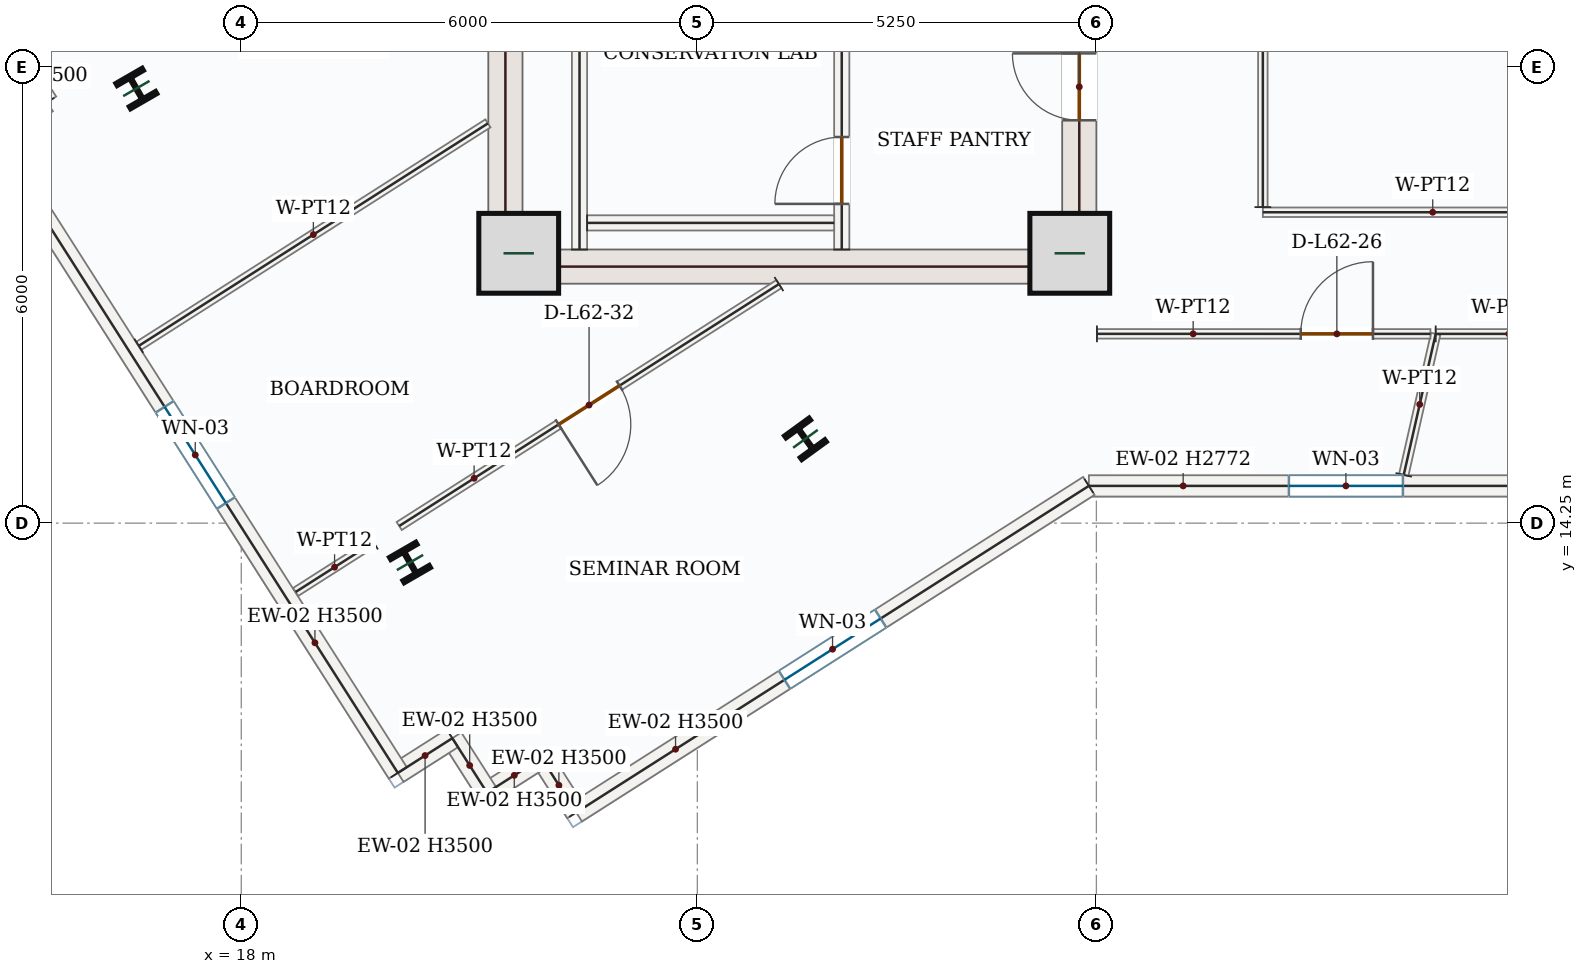
"""IFC4 building model, lengths in metres.
Left out: names, types, materials, properties, quantities, classifications, styles, units other than length and angle.
Written with IfcOpenShell. Run it as: python <this file> out.ifc"""

import sys

from ifc_helpers import new_model, si_unit, direction, frame, frame_2d, origin, origin_2d, place, context, subcontext, project, spatial, rectangle, i_section, extrude, source, transform, mapped, element, fill, save


model = new_model("IFC4")
c1 = context("Model", 3, precision=1e-05, world=origin(), true_north=direction((0.0, 1.0)))
c2 = subcontext(c1, "Body", "Model", "MODEL_VIEW")
j1 = project(units=[si_unit("LENGTHUNIT", "METRE"), si_unit("PLANEANGLEUNIT", "RADIAN")], contexts=[c1])
p1 = place(None, origin())
s1 = spatial("IfcSite", under=j1, at=p1, CompositionType="ELEMENT")
p2 = place(p1, origin())
s2 = spatial("IfcBuilding", under=s1, at=p2, CompositionType="ELEMENT")
p3 = place(p2, frame((0.0, 0.0, 261.6)))
s3 = spatial("IfcBuildingStorey", under=s2, at=p3, CompositionType="ELEMENT", Elevation=261.6)
m1 = source(origin(), c2, "Body", "SweptSolid", [
    extrude(rectangle(XDim=8.55, YDim=0.45, at=frame_2d((4.275, 0.0))), origin(), (0.0, 0.0, 1.0), 3.5),
])
p4 = place(p3, frame((21.475, 17.4, 0.0), z_axis=(0.0, 0.0, 1.0), x_axis=(0.0, 1.0, 0.0)))
e1 = element("IfcWall", 1, at=p4, inside=s3, PredefinedType="SHEAR", context=c2, shape_type="MappedRepresentation", body=[
    mapped(m1, transform((0.0, 0.0, 0.0), x_axis=(1.0, 0.0, 0.0), y_axis=(0.0, 1.0, 0.0), z_axis=(0.0, 0.0, 1.0), scale=1.0)),
])
p5 = place(p3, frame((29.025, 17.4, 0.0), z_axis=(0.0, 0.0, 1.0), x_axis=(0.0, 1.0, 0.0)))
e2 = element("IfcWall", 2, at=p5, inside=s3, PredefinedType="SHEAR", context=c2, shape_type="SweptSolid", body=[
    extrude(rectangle(XDim=8.55, YDim=0.45, at=frame_2d((4.275, 0.0))), origin(), (0.0, 0.0, 1.0), 3.5),
])
p6 = place(p5, frame((6.65, 0.0, 0.0)))
e3 = element("IfcOpeningElement", 3, at=p6, cuts=e2, PredefinedType="OPENING", context=c2, shape_type="SweptSolid", body=[
    extrude(rectangle(XDim=1.1, YDim=2.2, at=frame_2d((0.55, 1.1))), frame((0.0, 0.235, 0.0), z_axis=(0.0, -1.0, 0.0), x_axis=(1.0, 0.0, 0.0)), (0.0, 0.0, 1.0), 0.47),
])
p7 = place(p5, frame((2.15, 0.0, 0.0)))
e4 = element("IfcOpeningElement", 4, at=p7, cuts=e2, PredefinedType="OPENING", context=c2, shape_type="SweptSolid", body=[
    extrude(rectangle(XDim=0.88, YDim=2.1, at=frame_2d((0.44, 1.05))), frame((0.0, 0.235, 0.0), z_axis=(0.0, -1.0, 0.0), x_axis=(1.0, 0.0, 0.0)), (0.0, 0.0, 1.0), 0.47),
])
p8 = place(p5, frame((4.25, 0.0, 0.0)))
e5 = element("IfcOpeningElement", 5, at=p8, cuts=e2, PredefinedType="OPENING", context=c2, shape_type="SweptSolid", body=[
    extrude(rectangle(XDim=0.88, YDim=2.1, at=frame_2d((0.44, 1.05))), frame((0.0, 0.235, 0.0), z_axis=(0.0, -1.0, 0.0), x_axis=(1.0, 0.0, 0.0)), (0.0, 0.0, 1.0), 0.47),
])
m2 = source(origin(), c2, "Body", "SweptSolid", [
    extrude(rectangle(XDim=7.1, YDim=0.45, at=frame_2d((3.55, 0.0))), origin(), (0.0, 0.0, 1.0), 3.5),
])
p9 = place(p3, frame((21.7, 17.625, 0.0), z_axis=(0.0, 0.0, 1.0), x_axis=(1.0, 0.0, 0.0)))
e6 = element("IfcWall", 6, at=p9, inside=s3, PredefinedType="SHEAR", context=c2, shape_type="MappedRepresentation", body=[
    mapped(m2, transform((0.0, 0.0, 0.0), x_axis=(1.0, 0.0, 0.0), y_axis=(0.0, 1.0, 0.0), z_axis=(0.0, 0.0, 1.0), scale=1.0)),
])
m3 = source(origin(), c2, "Body", "SweptSolid", [
    extrude(rectangle(XDim=1.05, YDim=1.05, at=origin_2d()), origin(), (0.0, 0.0, 1.0), 3.75),
])
for number, where, z_axis, x_axis in (
    (7, (21.65, 17.8, 0.0), (0.0, 0.0, 1.0), (1.0, 0.0, 0.0)),
    (8, (28.9, 17.8, 0.0), (0.0, 0.0, 1.0), (1.0, 0.0, 0.0)),
):
    element("IfcColumn", number, at=place(p3, frame(where, z_axis=z_axis, x_axis=x_axis)), inside=s3, PredefinedType="COLUMN", context=c2, shape_type="MappedRepresentation", body=[
        mapped(m3, transform((0.0, 0.0, 0.0), x_axis=(1.0, 0.0, 0.0), y_axis=(0.0, 1.0, 0.0), z_axis=(0.0, 0.0, 1.0), scale=1.0)),
    ])
m4 = source(origin(), c2, "Body", "SweptSolid", [
    extrude(i_section(OverallWidth=0.399, OverallDepth=0.386, WebThickness=0.021, FlangeThickness=0.033, FilletRadius=0.018, at=origin_2d()), origin(), (0.0, 0.0, 1.0), 3.75),
])
for number, where, z_axis, x_axis in (
    (9, (25.422, 15.359, 0.0), (0.0, 0.0, 1.0), (0.809, 0.588, 0.0)),
    (10, (16.62, 19.968, 0.0), (0.0, 0.0, 1.0), (0.866, 0.5, 0.0)),
    (11, (20.22, 13.732, 0.0), (0.0, 0.0, 1.0), (0.866, 0.5, 0.0)),
):
    element("IfcColumn", number, at=place(p3, frame(where, z_axis=z_axis, x_axis=x_axis)), inside=s3, PredefinedType="COLUMN", context=c2, shape_type="MappedRepresentation", body=[
        mapped(m4, transform((0.0, 0.0, 0.0), x_axis=(1.0, 0.0, 0.0), y_axis=(0.0, 1.0, 0.0), z_axis=(0.0, 0.0, 1.0), scale=1.0)),
    ])
p10 = place(p3, frame((35.914, 14.74, 0.0), z_axis=(0.0, 0.0, 1.0), x_axis=(-1.0, 0.0, 0.0)))
e12 = element("IfcWall", 12, at=p10, inside=s3, PredefinedType="SOLIDWALL", context=c2, shape_type="SweptSolid", body=[
    extrude(rectangle(XDim=6.763, YDim=0.28, at=frame_2d((3.381, 0.0))), origin(), (0.0, 0.0, 1.0), 2.772),
])
p11 = place(p10, frame((2.631, 0.0, 0.85)))
e13 = element("IfcOpeningElement", 13, at=p11, cuts=e12, PredefinedType="OPENING", context=c2, shape_type="SweptSolid", body=[
    extrude(rectangle(XDim=1.5, YDim=1.5, at=frame_2d((0.75, 0.75))), frame((0.0, 0.15, 0.0), z_axis=(0.0, -1.0, 0.0), x_axis=(1.0, 0.0, 0.0)), (0.0, 0.0, 1.0), 0.3),
])
p12 = place(p3, frame((29.151, 14.74, 0.0), z_axis=(0.0, 0.0, 1.0), x_axis=(-0.843388565396, -0.537304129669, 0.0)))
e14 = element("IfcWall", 14, at=p12, inside=s3, PredefinedType="SOLIDWALL", context=c2, shape_type="SweptSolid", body=[
    extrude(rectangle(XDim=7.996, YDim=0.28, at=frame_2d((3.998, 0.0))), origin(), (0.0, 0.0, 1.0), 3.5),
])
p13 = place(p12, frame((3.248, 0.0, 0.85)))
e15 = element("IfcOpeningElement", 15, at=p13, cuts=e14, PredefinedType="OPENING", context=c2, shape_type="SweptSolid", body=[
    extrude(rectangle(XDim=1.5, YDim=1.5, at=frame_2d((0.75, 0.75))), frame((0.0, 0.15, 0.0), z_axis=(0.0, -1.0, 0.0), x_axis=(1.0, 0.0, 0.0)), (0.0, 0.0, 1.0), 0.3),
])
m5 = source(origin(), c2, "Body", "SweptSolid", [
    extrude(rectangle(XDim=0.85, YDim=0.28, at=frame_2d((0.425, 0.0))), origin(), (0.0, 0.0, 1.0), 3.5),
])
for number, where, z_axis, x_axis in (
    (16, (22.407, 10.444, 0.0), (0.0, 0.0, 1.0), (-0.537, 0.843, 0.0)),
    (17, (21.95, 11.16, 0.0), (0.0, 0.0, 1.0), (-0.843, -0.537, 0.0)),
    (18, (21.233, 10.704, 0.0), (0.0, 0.0, 1.0), (-0.537, 0.843, 0.0)),
    (19, (20.777, 11.421, 0.0), (0.0, 0.0, 1.0), (-0.843, -0.537, 0.0)),
):
    element("IfcWall", number, at=place(p3, frame(where, z_axis=z_axis, x_axis=x_axis)), inside=s3, PredefinedType="SOLIDWALL", context=c2, shape_type="MappedRepresentation", body=[
        mapped(m5, transform((0.0, 0.0, 0.0), x_axis=(1.0, 0.0, 0.0), y_axis=(0.0, 1.0, 0.0), z_axis=(0.0, 0.0, 1.0), scale=1.0)),
    ])
p14 = place(p3, frame((20.06, 10.964, 0.0), z_axis=(0.0, 0.0, 1.0), x_axis=(-0.537314949054, 0.843381672508, 0.0)))
e20 = element("IfcWall", 20, at=p14, inside=s3, PredefinedType="SOLIDWALL", context=c2, shape_type="SweptSolid", body=[
    extrude(rectangle(XDim=9.92, YDim=0.28, at=frame_2d((4.96, 0.0))), origin(), (0.0, 0.0, 1.0), 3.5),
])
p15 = place(p14, frame((4.21, 0.0, 0.85)))
e21 = element("IfcOpeningElement", 21, at=p15, cuts=e20, PredefinedType="OPENING", context=c2, shape_type="SweptSolid", body=[
    extrude(rectangle(XDim=1.5, YDim=1.5, at=frame_2d((0.75, 0.75))), frame((0.0, 0.15, 0.0), z_axis=(0.0, -1.0, 0.0), x_axis=(1.0, 0.0, 0.0)), (0.0, 0.0, 1.0), 0.3),
])
m6 = source(origin(), c2, "Body", "SweptSolid", [
    extrude(rectangle(XDim=0.85, YDim=0.28, at=frame_2d((0.425, 0.0))), origin(), (0.0, 0.0, 1.0), 3.5),
])
p16 = place(p3, frame((14.73, 19.33, 0.0), z_axis=(0.0, 0.0, 1.0), x_axis=(0.843401251716, 0.537284215853, 0.0)))
e22 = element("IfcWall", 22, at=p16, inside=s3, PredefinedType="SOLIDWALL", context=c2, shape_type="MappedRepresentation", body=[
    mapped(m6, transform((0.0, 0.0, 0.0), x_axis=(1.0, 0.0, 0.0), y_axis=(0.0, 1.0, 0.0), z_axis=(0.0, 0.0, 1.0), scale=1.0)),
])
for number, where, z_axis, x_axis in (
    (23, (15.447, 19.787, 0.0), (0.0, 0.0, 1.0), (-0.537, 0.843, 0.0)),
    (24, (14.99, 20.504, 0.0), (0.0, 0.0, 1.0), (0.843, 0.537, 0.0)),
):
    element("IfcWall", number, at=place(p3, frame(where, z_axis=z_axis, x_axis=x_axis)), inside=s3, PredefinedType="SOLIDWALL", context=c2, shape_type="MappedRepresentation", body=[
        mapped(m5, transform((0.0, 0.0, 0.0), x_axis=(1.0, 0.0, 0.0), y_axis=(0.0, 1.0, 0.0), z_axis=(0.0, 0.0, 1.0), scale=1.0)),
    ])
m7 = source(origin(), c2, "Body", "SweptSolid", [
    extrude(rectangle(XDim=7.87, YDim=0.2, at=frame_2d((3.935, 0.0))), origin(), (0.0, 0.0, 1.0), 3.5),
])
p17 = place(p3, frame((22.45, 17.85, 0.0), z_axis=(0.0, 0.0, 1.0), x_axis=(0.0, 1.0, 0.0)))
e25 = element("IfcWall", 25, at=p17, inside=s3, PredefinedType="SOLIDWALL", context=c2, shape_type="MappedRepresentation", body=[
    mapped(m7, transform((0.0, 0.0, 0.0), x_axis=(1.0, 0.0, 0.0), y_axis=(0.0, 1.0, 0.0), z_axis=(0.0, 0.0, 1.0), scale=1.0)),
])
p18 = place(p3, frame((25.9, 17.85, 0.0), z_axis=(0.0, 0.0, 1.0), x_axis=(0.0, 1.0, 0.0)))
e26 = element("IfcWall", 26, at=p18, inside=s3, PredefinedType="SOLIDWALL", context=c2, shape_type="SweptSolid", body=[
    extrude(rectangle(XDim=8.0, YDim=0.2, at=frame_2d((4.0, 0.0))), origin(), (0.0, 0.0, 1.0), 3.5),
])
p19 = place(p18, frame((6.2, 0.0, 0.0)))
e27 = element("IfcOpeningElement", 27, at=p19, cuts=e26, PredefinedType="OPENING", context=c2, shape_type="SweptSolid", body=[
    extrude(rectangle(XDim=1.0, YDim=2.15, at=frame_2d((0.5, 1.075))), frame((0.0, 0.11, 0.0), z_axis=(0.0, -1.0, 0.0), x_axis=(1.0, 0.0, 0.0)), (0.0, 0.0, 1.0), 0.22),
])
p20 = place(p18, frame((0.6, 0.0, 0.0)))
e28 = element("IfcOpeningElement", 28, at=p20, cuts=e26, PredefinedType="OPENING", context=c2, shape_type="SweptSolid", body=[
    extrude(rectangle(XDim=0.88, YDim=2.1, at=frame_2d((0.44, 1.05))), frame((0.0, 0.11, 0.0), z_axis=(0.0, -1.0, 0.0), x_axis=(1.0, 0.0, 0.0)), (0.0, 0.0, 1.0), 0.22),
])
m8 = source(origin(), c2, "Body", "SweptSolid", [
    extrude(rectangle(XDim=3.25, YDim=0.2, at=frame_2d((1.625, 0.0))), origin(), (0.0, 0.0, 1.0), 3.5),
])
p21 = place(p3, frame((22.55, 18.2, 0.0), z_axis=(0.0, 0.0, 1.0), x_axis=(1.0, 0.0, 0.0)))
e29 = element("IfcWall", 29, at=p21, inside=s3, PredefinedType="SOLIDWALL", context=c2, shape_type="MappedRepresentation", body=[
    mapped(m8, transform((0.0, 0.0, 0.0), x_axis=(1.0, 0.0, 0.0), y_axis=(0.0, 1.0, 0.0), z_axis=(0.0, 0.0, 1.0), scale=1.0)),
])
p22 = place(p3, frame((25.073, 17.395, 0.0), z_axis=(0.0, 0.0, 1.0), x_axis=(-0.843398332862, -0.537288797693, 0.0)))
e30 = element("IfcWall", 30, at=p22, inside=s3, PredefinedType="PARTITIONING", context=c2, shape_type="SweptSolid", body=[
    extrude(rectangle(XDim=5.924, YDim=0.125, at=frame_2d((2.962, 0.0))), origin(), (0.0, 0.0, 1.0), 3.5),
])
p23 = place(p22, frame((2.487, 0.0, 0.0)))
e31 = element("IfcOpeningElement", 31, at=p23, cuts=e30, PredefinedType="OPENING", context=c2, shape_type="SweptSolid", body=[
    extrude(rectangle(XDim=0.95, YDim=2.15, at=frame_2d((0.475, 1.075))), frame((0.0, 0.073, 0.0), z_axis=(0.0, -1.0, 0.0), x_axis=(1.0, 0.0, 0.0)), (0.0, 0.0, 1.0), 0.145),
])
m9 = source(origin(), c2, "Body", "SweptSolid", [
    extrude(rectangle(XDim=1.215, YDim=0.125, at=frame_2d((0.607, 0.0))), origin(), (0.0, 0.0, 1.0), 3.5),
])
p24 = place(p3, frame((19.74, 13.997, 0.0), z_axis=(0.0, 0.0, 1.0), x_axis=(-0.84340481812, -0.537278617453, 0.0)))
e32 = element("IfcWall", 32, at=p24, inside=s3, PredefinedType="PARTITIONING", context=c2, shape_type="MappedRepresentation", body=[
    mapped(m9, transform((0.0, 0.0, 0.0), x_axis=(1.0, 0.0, 0.0), y_axis=(0.0, 1.0, 0.0), z_axis=(0.0, 0.0, 1.0), scale=1.0)),
])
m10 = source(origin(), c2, "Body", "SweptSolid", [
    extrude(rectangle(XDim=5.446, YDim=0.125, at=frame_2d((2.723, 0.0))), origin(), (0.0, 0.0, 1.0), 3.5),
])
p25 = place(p3, frame((16.652, 16.583, 0.0), z_axis=(0.0, 0.0, 1.0), x_axis=(0.843395566027, 0.537293140851, 0.0)))
e33 = element("IfcWall", 33, at=p25, inside=s3, PredefinedType="PARTITIONING", context=c2, shape_type="MappedRepresentation", body=[
    mapped(m10, transform((0.0, 0.0, 0.0), x_axis=(1.0, 0.0, 0.0), y_axis=(0.0, 1.0, 0.0), z_axis=(0.0, 0.0, 1.0), scale=1.0)),
])
m11 = source(origin(), c2, "Body", "SweptSolid", [
    extrude(rectangle(XDim=4.47, YDim=0.125, at=frame_2d((2.235, 0.0))), origin(), (0.0, 0.0, 1.0), 3.5),
])
p26 = place(p3, frame((35.91, 18.34, 0.0), z_axis=(0.0, 0.0, 1.0), x_axis=(-1.0, 0.0, 0.0)))
e34 = element("IfcWall", 34, at=p26, inside=s3, PredefinedType="PARTITIONING", context=c2, shape_type="MappedRepresentation", body=[
    mapped(m11, transform((0.0, 0.0, 0.0), x_axis=(1.0, 0.0, 0.0), y_axis=(0.0, 1.0, 0.0), z_axis=(0.0, 0.0, 1.0), scale=1.0)),
])
m12 = source(origin(), c2, "Body", "SweptSolid", [
    extrude(rectangle(XDim=7.403, YDim=0.125, at=frame_2d((3.701, 0.0))), origin(), (0.0, 0.0, 1.0), 3.5),
])
p27 = place(p3, frame((31.44, 18.407, 0.0), z_axis=(0.0, 0.0, 1.0), x_axis=(0.0, 1.0, 0.0)))
e35 = element("IfcWall", 35, at=p27, inside=s3, PredefinedType="PARTITIONING", context=c2, shape_type="MappedRepresentation", body=[
    mapped(m12, transform((0.0, 0.0, 0.0), x_axis=(1.0, 0.0, 0.0), y_axis=(0.0, 1.0, 0.0), z_axis=(0.0, 0.0, 1.0), scale=1.0)),
])
p28 = place(p3, frame((33.714, 16.74, 0.0), z_axis=(0.0, 0.0, 1.0), x_axis=(1.0, 0.0, 0.0)))
e36 = element("IfcWall", 36, at=p28, inside=s3, PredefinedType="PARTITIONING", context=c2, shape_type="SweptSolid", body=[
    extrude(rectangle(XDim=5.099, YDim=0.125, at=frame_2d((2.55, 0.0))), origin(), (0.0, 0.0, 1.0), 3.5),
])
p29 = place(p28, frame((2.075, 0.0, 0.0)))
e37 = element("IfcOpeningElement", 37, at=p29, cuts=e36, PredefinedType="OPENING", context=c2, shape_type="SweptSolid", body=[
    extrude(rectangle(XDim=0.95, YDim=2.15, at=frame_2d((0.475, 1.075))), frame((0.0, 0.073, 0.0), z_axis=(0.0, -1.0, 0.0), x_axis=(1.0, 0.0, 0.0)), (0.0, 0.0, 1.0), 0.145),
])
m13 = source(origin(), c2, "Body", "SweptSolid", [
    extrude(rectangle(XDim=1.902, YDim=0.125, at=frame_2d((0.951, 0.0))), origin(), (0.0, 0.0, 1.0), 3.5),
])
p30 = place(p3, frame((33.294, 14.885, 0.0), z_axis=(0.0, 0.0, 1.0), x_axis=(0.221032985594, 0.975266332485, 0.0)))
e38 = element("IfcWall", 38, at=p30, inside=s3, PredefinedType="PARTITIONING", context=c2, shape_type="MappedRepresentation", body=[
    mapped(m13, transform((0.0, 0.0, 0.0), x_axis=(1.0, 0.0, 0.0), y_axis=(0.0, 1.0, 0.0), z_axis=(0.0, 0.0, 1.0), scale=1.0)),
])
p31 = place(p3, frame((29.258, 16.74, 0.0), z_axis=(0.0, 0.0, 1.0), x_axis=(0.999999998452, -5.5645206e-05, 0.0)))
e39 = element("IfcWall", 39, at=p31, inside=s3, PredefinedType="PARTITIONING", context=c2, shape_type="SweptSolid", body=[
    extrude(rectangle(XDim=4.387, YDim=0.125, at=frame_2d((2.194, 0.0))), origin(), (0.0, 0.0, 1.0), 3.5),
])
p32 = place(p31, frame((2.681, 0.0, 0.0)))
e40 = element("IfcOpeningElement", 40, at=p32, cuts=e39, PredefinedType="OPENING", context=c2, shape_type="SweptSolid", body=[
    extrude(rectangle(XDim=0.95, YDim=2.15, at=frame_2d((0.475, 1.075))), frame((0.0, 0.073, 0.0), z_axis=(0.0, -1.0, 0.0), x_axis=(1.0, 0.0, 0.0)), (0.0, 0.0, 1.0), 0.145),
])
m14 = source(origin(), c2, "Body", "SweptSolid", [
    extrude(rectangle(XDim=1.5, YDim=1.5, at=frame_2d((0.75, 0.75))), frame((0.0, 0.03, 0.0), z_axis=(0.0, -1.0, 0.0), x_axis=(1.0, 0.0, 0.0)), (0.0, 0.0, 1.0), 0.06),
])
p33 = place(p11, origin())
e41 = element("IfcWindow", 41, at=p33, inside=s3, PartitioningType="SINGLE_PANEL", PredefinedType="WINDOW", context=c2, shape_type="MappedRepresentation", body=[
    mapped(m14, transform((0.0, 0.0, 0.0), x_axis=(1.0, 0.0, 0.0), y_axis=(0.0, 1.0, 0.0), z_axis=(0.0, 0.0, 1.0), scale=1.0)),
])
fill(e13, e41)
p34 = place(p13, origin())
e42 = element("IfcWindow", 42, at=p34, inside=s3, PartitioningType="SINGLE_PANEL", PredefinedType="WINDOW", context=c2, shape_type="MappedRepresentation", body=[
    mapped(m14, transform((0.0, 0.0, 0.0), x_axis=(1.0, 0.0, 0.0), y_axis=(0.0, 1.0, 0.0), z_axis=(0.0, 0.0, 1.0), scale=1.0)),
])
fill(e15, e42)
p35 = place(p15, origin())
e43 = element("IfcWindow", 43, at=p35, inside=s3, PartitioningType="SINGLE_PANEL", PredefinedType="WINDOW", context=c2, shape_type="MappedRepresentation", body=[
    mapped(m14, transform((0.0, 0.0, 0.0), x_axis=(1.0, 0.0, 0.0), y_axis=(0.0, 1.0, 0.0), z_axis=(0.0, 0.0, 1.0), scale=1.0)),
])
fill(e21, e43)
m15 = source(origin(), c2, "Body", "SweptSolid", [
    extrude(rectangle(XDim=0.88, YDim=2.1, at=frame_2d((0.44, 1.05))), frame((0.0, 0.025, 0.0), z_axis=(0.0, -1.0, 0.0), x_axis=(1.0, 0.0, 0.0)), (0.0, 0.0, 1.0), 0.05),
])
p36 = place(p20, origin())
e44 = element("IfcDoor", 44, at=p36, inside=s3, OperationType="SINGLE_SWING_LEFT", PredefinedType="DOOR", context=c2, shape_type="MappedRepresentation", body=[
    mapped(m15, transform((0.0, 0.0, 0.0), x_axis=(1.0, 0.0, 0.0), y_axis=(0.0, 1.0, 0.0), z_axis=(0.0, 0.0, 1.0), scale=1.0)),
])
fill(e28, e44)
p37 = place(p7, origin())
e45 = element("IfcDoor", 45, at=p37, inside=s3, OperationType="SINGLE_SWING_RIGHT", PredefinedType="DOOR", context=c2, shape_type="MappedRepresentation", body=[
    mapped(m15, transform((0.0, 0.0, 0.0), x_axis=(1.0, 0.0, 0.0), y_axis=(0.0, 1.0, 0.0), z_axis=(0.0, 0.0, 1.0), scale=1.0)),
])
fill(e4, e45)
m16 = source(origin(), c2, "Body", "SweptSolid", [
    extrude(rectangle(XDim=0.95, YDim=2.15, at=frame_2d((0.475, 1.075))), frame((0.0, 0.025, 0.0), z_axis=(0.0, -1.0, 0.0), x_axis=(1.0, 0.0, 0.0)), (0.0, 0.0, 1.0), 0.05),
])
p38 = place(p32, origin())
e46 = element("IfcDoor", 46, at=p38, inside=s3, OperationType="SINGLE_SWING_RIGHT", PredefinedType="DOOR", context=c2, shape_type="MappedRepresentation", body=[
    mapped(m16, transform((0.0, 0.0, 0.0), x_axis=(1.0, 0.0, 0.0), y_axis=(0.0, 1.0, 0.0), z_axis=(0.0, 0.0, 1.0), scale=1.0)),
])
fill(e40, e46)
p39 = place(p23, origin())
e47 = element("IfcDoor", 47, at=p39, inside=s3, OperationType="SINGLE_SWING_RIGHT", PredefinedType="DOOR", context=c2, shape_type="MappedRepresentation", body=[
    mapped(m16, transform((0.0, 0.0, 0.0), x_axis=(1.0, 0.0, 0.0), y_axis=(0.0, 1.0, 0.0), z_axis=(0.0, 0.0, 1.0), scale=1.0)),
])
fill(e31, e47)
save(model, sys.argv[1])
